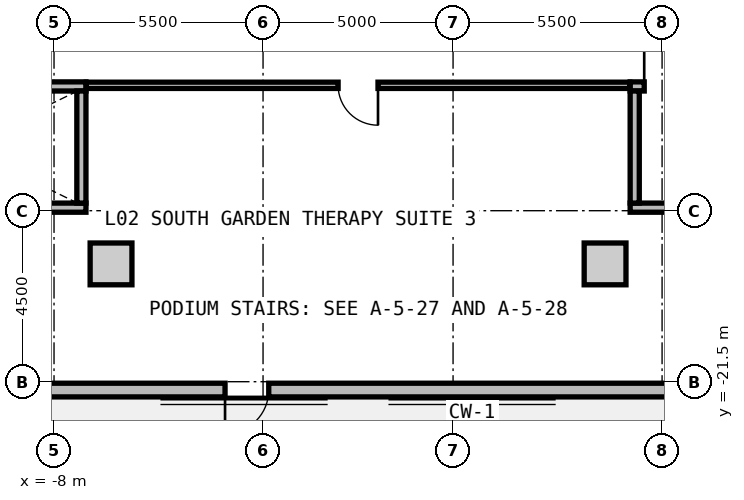
"""IFC4 building model, lengths in metres.
Left out: names, types, materials, properties, quantities, classifications, styles, units other than length and angle.
Written with IfcOpenShell. Run it as: python <this file> out.ifc"""

import sys

from ifc_helpers import new_model, si_unit, direction, frame, frame_2d, origin, origin_2d, place, context, subcontext, project, spatial, rectangle, extrude, source, transform, mapped, element, fill, save


model = new_model("IFC4")
c1 = context("Model", 3, precision=1e-05, world=origin(), true_north=direction((0.0, 1.0)))
c2 = subcontext(c1, "Body", "Model", "MODEL_VIEW")
j1 = project(units=[si_unit("LENGTHUNIT", "METRE"), si_unit("PLANEANGLEUNIT", "RADIAN")], contexts=[c1])
p1 = place(None, origin())
s1 = spatial("IfcSite", under=j1, at=p1, CompositionType="ELEMENT")
p2 = place(p1, origin())
s2 = spatial("IfcBuilding", under=s1, at=p2, CompositionType="ELEMENT")
p3 = place(p2, frame((0.0, 0.0, 8.4)))
s3 = spatial("IfcBuildingStorey", under=s2, at=p3, CompositionType="ELEMENT", Elevation=8.4)
m1 = source(origin(), c2, "Body", "SweptSolid", [
    extrude(rectangle(XDim=1.1, YDim=1.1, at=origin_2d()), origin(), (0.0, 0.0, 1.0), 4.2),
])
for number, where, z_axis, x_axis in (
    (1, (-6.5, -18.4, 0.0), (0.0, 0.0, 1.0), (1.0, 0.0, 0.0)),
    (2, (6.5, -18.4, 0.0), (0.0, 0.0, 1.0), (1.0, 0.0, 0.0)),
):
    element("IfcColumn", number, at=place(p3, frame(where, z_axis=z_axis, x_axis=x_axis)), inside=s3, PredefinedType="COLUMN", context=c2, shape_type="MappedRepresentation", body=[
        mapped(m1, transform((0.0, 0.0, 0.0), x_axis=(1.0, 0.0, 0.0), y_axis=(0.0, 1.0, 0.0), z_axis=(0.0, 0.0, 1.0), scale=1.0)),
    ])
m2 = source(origin(), c2, "Body", "SweptSolid", [
    extrude(rectangle(XDim=102.04, YDim=0.36, at=frame_2d((51.02, 0.0))), origin(), (0.0, 0.0, 1.0), 3.88),
])
p4 = place(p3, frame((51.02, -21.72, 0.0), z_axis=(0.0, 0.0, 1.0), x_axis=(-1.0, 0.0, 0.0)))
e3 = element("IfcWall", 3, at=p4, inside=s3, PredefinedType="SOLIDWALL", context=c2, shape_type="MappedRepresentation", body=[
    mapped(m2, transform((0.0, 0.0, 0.0), x_axis=(1.0, 0.0, 0.0), y_axis=(0.0, 1.0, 0.0), z_axis=(0.0, 0.0, 1.0), scale=1.0)),
])
p5 = place(p4, frame((53.37, 0.0, 0.0)))
e4 = element("IfcOpeningElement", 4, at=p5, cuts=e3, PredefinedType="OPENING", context=c2, shape_type="SweptSolid", body=[
    extrude(rectangle(XDim=1.15, YDim=2.25, at=frame_2d((0.575, 1.125))), frame((0.0, 0.19, 0.0), z_axis=(0.0, -1.0, 0.0), x_axis=(1.0, 0.0, 0.0)), (0.0, 0.0, 1.0), 0.38),
])
p6 = place(p4, frame((4.0, 0.0, 0.9)))
e5 = element("IfcOpeningElement", 5, at=p6, cuts=e3, PredefinedType="OPENING", context=c2, shape_type="SweptSolid", body=[
    extrude(rectangle(XDim=1.8, YDim=2.0, at=frame_2d((0.9, 1.0))), frame((0.0, 0.19, 0.0), z_axis=(0.0, -1.0, 0.0), x_axis=(1.0, 0.0, 0.0)), (0.0, 0.0, 1.0), 0.38),
])
p7 = place(p4, frame((12.4, 0.0, 0.85)))
e6 = element("IfcOpeningElement", 6, at=p7, cuts=e3, PredefinedType="OPENING", context=c2, shape_type="SweptSolid", body=[
    extrude(rectangle(XDim=2.4, YDim=2.2, at=frame_2d((1.2, 1.1))), frame((0.0, 0.19, 0.0), z_axis=(0.0, -1.0, 0.0), x_axis=(1.0, 0.0, 0.0)), (0.0, 0.0, 1.0), 0.38),
])
p8 = place(p4, frame((29.2, 0.0, 0.9)))
e7 = element("IfcOpeningElement", 7, at=p8, cuts=e3, PredefinedType="OPENING", context=c2, shape_type="SweptSolid", body=[
    extrude(rectangle(XDim=1.8, YDim=2.0, at=frame_2d((0.9, 1.0))), frame((0.0, 0.19, 0.0), z_axis=(0.0, -1.0, 0.0), x_axis=(1.0, 0.0, 0.0)), (0.0, 0.0, 1.0), 0.38),
])
p9 = place(p4, frame((37.6, 0.0, 0.85)))
e8 = element("IfcOpeningElement", 8, at=p9, cuts=e3, PredefinedType="OPENING", context=c2, shape_type="SweptSolid", body=[
    extrude(rectangle(XDim=2.4, YDim=2.2, at=frame_2d((1.2, 1.1))), frame((0.0, 0.19, 0.0), z_axis=(0.0, -1.0, 0.0), x_axis=(1.0, 0.0, 0.0)), (0.0, 0.0, 1.0), 0.38),
])
p10 = place(p4, frame((62.8, 0.0, 0.85)))
e9 = element("IfcOpeningElement", 9, at=p10, cuts=e3, PredefinedType="OPENING", context=c2, shape_type="SweptSolid", body=[
    extrude(rectangle(XDim=2.4, YDim=2.2, at=frame_2d((1.2, 1.1))), frame((0.0, 0.19, 0.0), z_axis=(0.0, -1.0, 0.0), x_axis=(1.0, 0.0, 0.0)), (0.0, 0.0, 1.0), 0.38),
])
p11 = place(p4, frame((71.2, 0.0, 0.85)))
e10 = element("IfcOpeningElement", 10, at=p11, cuts=e3, PredefinedType="OPENING", context=c2, shape_type="SweptSolid", body=[
    extrude(rectangle(XDim=3.0, YDim=2.1, at=frame_2d((1.5, 1.05))), frame((0.0, 0.19, 0.0), z_axis=(0.0, -1.0, 0.0), x_axis=(1.0, 0.0, 0.0)), (0.0, 0.0, 1.0), 0.38),
])
p12 = place(p4, frame((88.0, 0.0, 0.85)))
e11 = element("IfcOpeningElement", 11, at=p12, cuts=e3, PredefinedType="OPENING", context=c2, shape_type="SweptSolid", body=[
    extrude(rectangle(XDim=2.4, YDim=2.2, at=frame_2d((1.2, 1.1))), frame((0.0, 0.19, 0.0), z_axis=(0.0, -1.0, 0.0), x_axis=(1.0, 0.0, 0.0)), (0.0, 0.0, 1.0), 0.38),
])
m3 = source(origin(), c2, "Body", "SweptSolid", [
    extrude(rectangle(XDim=7.88, YDim=0.24, at=frame_2d((3.94, 0.0))), origin(), (0.0, 0.0, 1.0), 3.88),
])
p13 = place(p3, frame((-15.04, -13.73, 0.0), z_axis=(0.0, 0.0, 1.0), x_axis=(1.0, 0.0, 0.0)))
e12 = element("IfcWall", 12, at=p13, inside=s3, PredefinedType="PARTITIONING", context=c2, shape_type="MappedRepresentation", body=[
    mapped(m3, transform((0.0, 0.0, 0.0), x_axis=(1.0, 0.0, 0.0), y_axis=(0.0, 1.0, 0.0), z_axis=(0.0, 0.0, 1.0), scale=1.0)),
])
p14 = place(p13, frame((0.37, 0.0, 0.0)))
e13 = element("IfcOpeningElement", 13, at=p14, cuts=e12, PredefinedType="OPENING", context=c2, shape_type="SweptSolid", body=[
    extrude(rectangle(XDim=1.1, YDim=2.15, at=frame_2d((0.55, 1.075))), frame((0.0, 0.13, 0.0), z_axis=(0.0, -1.0, 0.0), x_axis=(1.0, 0.0, 0.0)), (0.0, 0.0, 1.0), 0.26),
])
p15 = place(p3, frame((-15.04, -16.92, 0.0), z_axis=(0.0, 0.0, 1.0), x_axis=(1.0, 0.0, 0.0)))
e14 = element("IfcWall", 14, at=p15, inside=s3, PredefinedType="PARTITIONING", context=c2, shape_type="MappedRepresentation", body=[
    mapped(m3, transform((0.0, 0.0, 0.0), x_axis=(1.0, 0.0, 0.0), y_axis=(0.0, 1.0, 0.0), z_axis=(0.0, 0.0, 1.0), scale=1.0)),
])
m4 = source(origin(), c2, "Body", "SweptSolid", [
    extrude(rectangle(XDim=2.95, YDim=0.24, at=frame_2d((1.475, 0.0))), origin(), (0.0, 0.0, 1.0), 3.88),
])
p16 = place(p3, frame((-7.28, -16.8, 0.0), z_axis=(0.0, 0.0, 1.0), x_axis=(0.0, 1.0, 0.0)))
e15 = element("IfcWall", 15, at=p16, inside=s3, PredefinedType="PARTITIONING", context=c2, shape_type="MappedRepresentation", body=[
    mapped(m4, transform((0.0, 0.0, 0.0), x_axis=(1.0, 0.0, 0.0), y_axis=(0.0, 1.0, 0.0), z_axis=(0.0, 0.0, 1.0), scale=1.0)),
])
p17 = place(p3, frame((7.16, -13.73, 0.0), z_axis=(0.0, 0.0, 1.0), x_axis=(1.0, 0.0, 0.0)))
e16 = element("IfcWall", 16, at=p17, inside=s3, PredefinedType="PARTITIONING", context=c2, shape_type="MappedRepresentation", body=[
    mapped(m3, transform((0.0, 0.0, 0.0), x_axis=(1.0, 0.0, 0.0), y_axis=(0.0, 1.0, 0.0), z_axis=(0.0, 0.0, 1.0), scale=1.0)),
])
p18 = place(p17, frame((0.37, 0.0, 0.0)))
e17 = element("IfcOpeningElement", 17, at=p18, cuts=e16, PredefinedType="OPENING", context=c2, shape_type="SweptSolid", body=[
    extrude(rectangle(XDim=1.1, YDim=2.15, at=frame_2d((0.55, 1.075))), frame((0.0, 0.13, 0.0), z_axis=(0.0, -1.0, 0.0), x_axis=(1.0, 0.0, 0.0)), (0.0, 0.0, 1.0), 0.26),
])
p19 = place(p3, frame((7.16, -16.92, 0.0), z_axis=(0.0, 0.0, 1.0), x_axis=(1.0, 0.0, 0.0)))
e18 = element("IfcWall", 18, at=p19, inside=s3, PredefinedType="PARTITIONING", context=c2, shape_type="MappedRepresentation", body=[
    mapped(m3, transform((0.0, 0.0, 0.0), x_axis=(1.0, 0.0, 0.0), y_axis=(0.0, 1.0, 0.0), z_axis=(0.0, 0.0, 1.0), scale=1.0)),
])
p20 = place(p3, frame((7.28, -16.8, 0.0), z_axis=(0.0, 0.0, 1.0), x_axis=(0.0, 1.0, 0.0)))
e19 = element("IfcWall", 19, at=p20, inside=s3, PredefinedType="PARTITIONING", context=c2, shape_type="MappedRepresentation", body=[
    mapped(m4, transform((0.0, 0.0, 0.0), x_axis=(1.0, 0.0, 0.0), y_axis=(0.0, 1.0, 0.0), z_axis=(0.0, 0.0, 1.0), scale=1.0)),
])
m5 = source(origin(), c2, "Body", "SweptSolid", [
    extrude(rectangle(XDim=14.3, YDim=0.165, at=frame_2d((7.15, 0.0))), origin(), (0.0, 0.0, 1.0), 3.865),
])
p21 = place(p3, frame((-7.15, -13.7, 0.0), z_axis=(0.0, 0.0, 1.0), x_axis=(1.0, 0.0, 0.0)))
e20 = element("IfcWall", 20, at=p21, inside=s3, PredefinedType="PARTITIONING", context=c2, shape_type="MappedRepresentation", body=[
    mapped(m5, transform((0.0, 0.0, 0.0), x_axis=(1.0, 0.0, 0.0), y_axis=(0.0, 1.0, 0.0), z_axis=(0.0, 0.0, 1.0), scale=1.0)),
])
p22 = place(p21, frame((6.625, 0.0, 0.0)))
e21 = element("IfcOpeningElement", 21, at=p22, cuts=e20, PredefinedType="OPENING", context=c2, shape_type="SweptSolid", body=[
    extrude(rectangle(XDim=1.05, YDim=2.15, at=frame_2d((0.525, 1.075))), frame((0.0, 0.093, 0.0), z_axis=(0.0, -1.0, 0.0), x_axis=(1.0, 0.0, 0.0)), (0.0, 0.0, 1.0), 0.185),
])
m6 = source(origin(), c2, "Body", "SweptSolid", [
    extrude(rectangle(XDim=1.15, YDim=2.25, at=frame_2d((0.575, 1.125))), frame((0.0, 0.025, 0.0), z_axis=(0.0, -1.0, 0.0), x_axis=(1.0, 0.0, 0.0)), (0.0, 0.0, 1.0), 0.05),
])
p23 = place(p5, origin())
e22 = element("IfcDoor", 22, at=p23, inside=s3, OperationType="SINGLE_SWING_RIGHT", PredefinedType="DOOR", context=c2, shape_type="MappedRepresentation", body=[
    mapped(m6, transform((0.0, 0.0, 0.0), x_axis=(1.0, 0.0, 0.0), y_axis=(0.0, 1.0, 0.0), z_axis=(0.0, 0.0, 1.0), scale=1.0)),
])
fill(e4, e22)
m7 = source(origin(), c2, "Body", "SweptSolid", [
    extrude(rectangle(XDim=1.1, YDim=2.15, at=frame_2d((0.55, 1.075))), frame((0.0, 0.025, 0.0), z_axis=(0.0, -1.0, 0.0), x_axis=(1.0, 0.0, 0.0)), (0.0, 0.0, 1.0), 0.05),
])
p24 = place(p18, origin())
e23 = element("IfcDoor", 23, at=p24, inside=s3, OperationType="SINGLE_SWING_LEFT", PredefinedType="DOOR", context=c2, shape_type="MappedRepresentation", body=[
    mapped(m7, transform((0.0, 0.0, 0.0), x_axis=(1.0, 0.0, 0.0), y_axis=(0.0, 1.0, 0.0), z_axis=(0.0, 0.0, 1.0), scale=1.0)),
])
fill(e17, e23)
m8 = source(origin(), c2, "Body", "SweptSolid", [
    extrude(rectangle(XDim=1.05, YDim=2.15, at=frame_2d((0.525, 1.075))), frame((0.0, 0.025, 0.0), z_axis=(0.0, -1.0, 0.0), x_axis=(1.0, 0.0, 0.0)), (0.0, 0.0, 1.0), 0.05),
])
p25 = place(p22, frame((1.05, 0.0, 0.0), z_axis=(0.0, 0.0, 1.0), x_axis=(-1.0, 0.0, 0.0)))
e24 = element("IfcDoor", 24, at=p25, inside=s3, OperationType="SINGLE_SWING_LEFT", PredefinedType="DOOR", context=c2, shape_type="MappedRepresentation", body=[
    mapped(m8, transform((0.0, 0.0, 0.0), x_axis=(1.0, 0.0, 0.0), y_axis=(0.0, 1.0, 0.0), z_axis=(0.0, 0.0, 1.0), scale=1.0)),
])
fill(e21, e24)
save(model, sys.argv[1])
